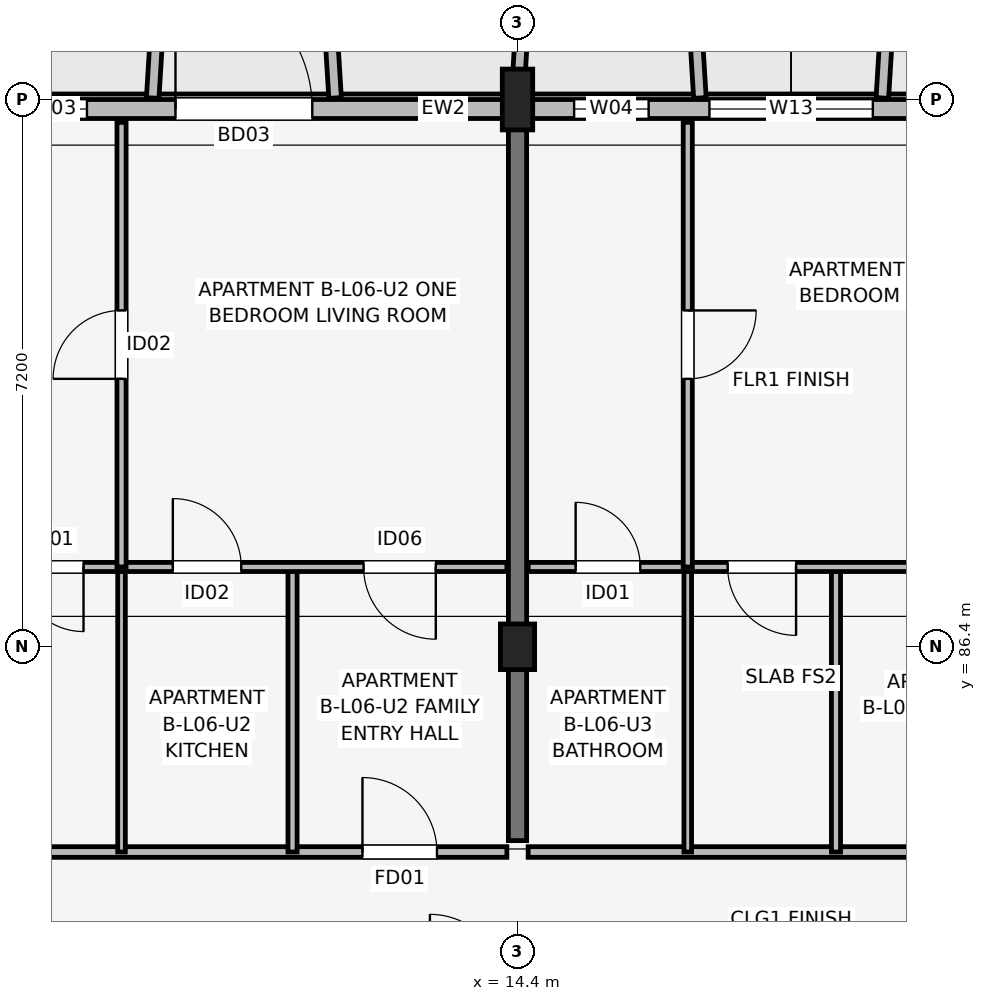
"""IFC4 building model, lengths in metres.
Left out: names, types, materials, properties, quantities, classifications, styles, units other than length and angle.
Written with IfcOpenShell. Run it as: python <this file> out.ifc"""

import sys

from ifc_helpers import new_model, si_unit, direction, frame, frame_2d, origin, origin_2d, place, context, subcontext, project, spatial, rectangle, extrude, element, fill, save


model = new_model("IFC4")
c1 = context("Model", 3, precision=1e-05, world=origin(), true_north=direction((0.0, 1.0)))
c2 = subcontext(c1, "Body", "Model", "MODEL_VIEW")
j1 = project(units=[si_unit("LENGTHUNIT", "METRE"), si_unit("PLANEANGLEUNIT", "RADIAN")], contexts=[c1])
p1 = place(None, origin())
s1 = spatial("IfcSite", under=j1, at=p1, CompositionType="ELEMENT")
p2 = place(p1, origin())
s2 = spatial("IfcBuilding", under=s1, at=p2, CompositionType="ELEMENT")
p3 = place(p2, frame((0.0, 0.0, 21.3)))
s3 = spatial("IfcBuildingStorey", under=s2, at=p3, CompositionType="ELEMENT", Elevation=21.3)
p4 = place(p3, frame((14.4, 86.4, 0.0), z_axis=(0.0, 0.0, 1.0), x_axis=(1.0, 0.0, 0.0)))
e1 = element("IfcColumn", 1, at=p4, inside=s3, PredefinedType="COLUMN", context=c2, shape_type="SweptSolid", body=[
    extrude(rectangle(XDim=0.45, YDim=0.6, at=origin_2d()), origin(), (0.0, 0.0, 1.0), 3.15),
])
p5 = place(p3, frame((14.4, 93.6, 0.0), z_axis=(0.0, 0.0, 1.0), x_axis=(1.0, 0.0, 0.0)))
e2 = element("IfcColumn", 2, at=p5, inside=s3, PredefinedType="COLUMN", context=c2, shape_type="SweptSolid", body=[
    extrude(rectangle(XDim=0.4, YDim=0.8, at=origin_2d()), origin(), (0.0, 0.0, 1.0), 3.15),
])
p6 = place(p3, frame((14.4, 83.85, 0.0), z_axis=(0.0, 0.0, 1.0), x_axis=(0.0, 1.0, 0.0)))
e3 = element("IfcWall", 3, at=p6, inside=s3, PredefinedType="SHEAR", context=c2, shape_type="SweptSolid", body=[
    extrude(rectangle(XDim=9.4, YDim=0.24, at=frame_2d((4.7, 0.0))), origin(), (0.0, 0.0, 1.0), 3.15),
])
p7 = place(p3, frame((32.8, 93.475, 0.0), z_axis=(0.0, 0.0, 1.0), x_axis=(-1.0, 0.0, 0.0)))
e4 = element("IfcWall", 4, at=p7, inside=s3, PredefinedType="SOLIDWALL", context=c2, shape_type="SweptSolid", body=[
    extrude(rectangle(XDim=29.6, YDim=0.25, at=frame_2d((14.8, 0.0))), origin(), (0.0, 0.0, 1.0), 2.43),
])
p8 = place(p7, frame((22.9, 0.0, 0.0), z_axis=(0.0, 0.0, 1.0), x_axis=(-1.0, 0.0, 0.0)))
e5 = element("IfcOpeningElement", 5, at=p8, cuts=e4, PredefinedType="OPENING", context=c2, shape_type="SweptSolid", body=[
    extrude(rectangle(XDim=1.8, YDim=2.15, at=frame_2d((0.9, 1.075))), frame((0.0, 0.135, 0.0), z_axis=(0.0, -1.0, 0.0), x_axis=(1.0, 0.0, 0.0)), (0.0, 0.0, 1.0), 0.27),
])
p9 = place(p7, frame((8.425, 0.0, 0.0), z_axis=(0.0, 0.0, 1.0), x_axis=(-1.0, 0.0, 0.0)))
e6 = element("IfcOpeningElement", 6, at=p9, cuts=e4, PredefinedType="OPENING", context=c2, shape_type="SweptSolid", body=[
    extrude(rectangle(XDim=1.65, YDim=2.15, at=frame_2d((0.825, 1.075))), frame((0.0, 0.135, 0.0), z_axis=(0.0, -1.0, 0.0), x_axis=(1.0, 0.0, 0.0)), (0.0, 0.0, 1.0), 0.27),
])
p10 = place(p7, frame((26.25, 0.0, 0.75)))
e7 = element("IfcOpeningElement", 7, at=p10, cuts=e4, PredefinedType="OPENING", context=c2, shape_type="SweptSolid", body=[
    extrude(rectangle(XDim=0.72, YDim=1.35, at=frame_2d((0.36, 0.675))), frame((0.0, 0.135, 0.0), z_axis=(0.0, -1.0, 0.0), x_axis=(1.0, 0.0, 0.0)), (0.0, 0.0, 1.0), 0.27),
])
p11 = place(p7, frame((24.065, 0.0, 0.75)))
e8 = element("IfcOpeningElement", 8, at=p11, cuts=e4, PredefinedType="OPENING", context=c2, shape_type="SweptSolid", body=[
    extrude(rectangle(XDim=0.85, YDim=1.4, at=frame_2d((0.425, 0.7))), frame((0.0, 0.135, 0.0), z_axis=(0.0, -1.0, 0.0), x_axis=(1.0, 0.0, 0.0)), (0.0, 0.0, 1.0), 0.27),
])
p12 = place(p7, frame((16.675, 0.0, 0.75)))
e9 = element("IfcOpeningElement", 9, at=p12, cuts=e4, PredefinedType="OPENING", context=c2, shape_type="SweptSolid", body=[
    extrude(rectangle(XDim=0.98, YDim=1.45, at=frame_2d((0.49, 0.725))), frame((0.0, 0.135, 0.0), z_axis=(0.0, -1.0, 0.0), x_axis=(1.0, 0.0, 0.0)), (0.0, 0.0, 1.0), 0.27),
])
p13 = place(p7, frame((13.725, 0.0, 0.67)))
e10 = element("IfcOpeningElement", 10, at=p13, cuts=e4, PredefinedType="OPENING", context=c2, shape_type="SweptSolid", body=[
    extrude(rectangle(XDim=2.15, YDim=1.65, at=frame_2d((1.075, 0.825))), frame((0.0, 0.135, 0.0), z_axis=(0.0, -1.0, 0.0), x_axis=(1.0, 0.0, 0.0)), (0.0, 0.0, 1.0), 0.27),
])
p14 = place(p7, frame((9.355, 0.0, 0.75)))
e11 = element("IfcOpeningElement", 11, at=p14, cuts=e4, PredefinedType="OPENING", context=c2, shape_type="SweptSolid", body=[
    extrude(rectangle(XDim=1.22, YDim=1.5, at=frame_2d((0.61, 0.75))), frame((0.0, 0.135, 0.0), z_axis=(0.0, -1.0, 0.0), x_axis=(1.0, 0.0, 0.0)), (0.0, 0.0, 1.0), 0.27),
])
p15 = place(p7, frame((1.89, 0.0, 0.7)))
e12 = element("IfcOpeningElement", 12, at=p15, cuts=e4, PredefinedType="OPENING", context=c2, shape_type="SweptSolid", body=[
    extrude(rectangle(XDim=1.58, YDim=1.6, at=frame_2d((0.79, 0.8))), frame((0.0, 0.135, 0.0), z_axis=(0.0, -1.0, 0.0), x_axis=(1.0, 0.0, 0.0)), (0.0, 0.0, 1.0), 0.27),
])
for number, where, z_axis, x_axis in (
    (13, (9.6, 93.62, 0.0), (0.0, 0.0, 1.0), (0.061, 0.998, 0.0)),
    (14, (12.0, 93.62, 0.0), (0.0, 0.0, 1.0), (-0.061, 0.998, 0.0)),
):
    element("IfcWall", number, at=place(p3, frame(where, z_axis=z_axis, x_axis=x_axis)), inside=s3, PredefinedType="ELEMENTEDWALL", context=c2, shape_type="SweptSolid", body=[
        extrude(rectangle(XDim=1.964, YDim=0.165, at=frame_2d((0.982, 0.0))), origin(), (0.0, 0.0, 1.0), 2.48),
    ])
for number, where, z_axis, x_axis in (
    (15, (14.4, 93.62, 0.0), (0.0, 0.0, 1.0), (0.061, 0.998, 0.0)),
    (16, (16.8, 93.62, 0.0), (0.0, 0.0, 1.0), (-0.061, 0.998, 0.0)),
    (17, (19.2, 93.62, 0.0), (0.0, 0.0, 1.0), (0.061, 0.998, 0.0)),
):
    element("IfcWall", number, at=place(p3, frame(where, z_axis=z_axis, x_axis=x_axis)), inside=s3, PredefinedType="ELEMENTEDWALL", context=c2, shape_type="SweptSolid", body=[
        extrude(rectangle(XDim=1.964, YDim=0.165, at=frame_2d((0.982, 0.0))), origin(), (0.0, 0.0, 1.0), 2.53),
    ])
p16 = place(p3, frame((7.34, 83.7, 0.0), z_axis=(0.0, 0.0, 1.0), x_axis=(1.0, 0.0, 0.0)))
e18 = element("IfcWall", 18, at=p16, inside=s3, PredefinedType="PARTITIONING", context=c2, shape_type="SweptSolid", body=[
    extrude(rectangle(XDim=6.92, YDim=0.14, at=frame_2d((3.46, 0.0))), origin(), (0.0, 0.0, 1.0), 2.38),
])
p17 = place(p16, frame((5.02, 0.0, 0.0)))
e19 = element("IfcOpeningElement", 19, at=p17, cuts=e18, PredefinedType="OPENING", context=c2, shape_type="SweptSolid", body=[
    extrude(rectangle(XDim=0.98, YDim=2.1, at=frame_2d((0.49, 1.05))), frame((0.0, 0.08, 0.0), z_axis=(0.0, -1.0, 0.0), x_axis=(1.0, 0.0, 0.0)), (0.0, 0.0, 1.0), 0.16),
])
p18 = place(p3, frame((9.19, 83.7, 0.0), z_axis=(0.0, 0.0, 1.0), x_axis=(0.0, 1.0, 0.0)))
e20 = element("IfcWall", 20, at=p18, inside=s3, PredefinedType="PARTITIONING", context=c2, shape_type="SweptSolid", body=[
    extrude(rectangle(XDim=3.75, YDim=0.1, at=frame_2d((1.875, 0.0))), origin(), (0.0, 0.0, 1.0), 2.38),
])
p19 = place(p3, frame((11.44, 83.7, 0.0), z_axis=(0.0, 0.0, 1.0), x_axis=(0.0, 1.0, 0.0)))
e21 = element("IfcWall", 21, at=p19, inside=s3, PredefinedType="PARTITIONING", context=c2, shape_type="SweptSolid", body=[
    extrude(rectangle(XDim=3.75, YDim=0.12, at=frame_2d((1.875, 0.0))), origin(), (0.0, 0.0, 1.0), 2.38),
])
p20 = place(p3, frame((7.34, 87.45, 0.0), z_axis=(0.0, 0.0, 1.0), x_axis=(1.0, 0.0, 0.0)))
e22 = element("IfcWall", 22, at=p20, inside=s3, PredefinedType="PARTITIONING", context=c2, shape_type="SweptSolid", body=[
    extrude(rectangle(XDim=6.92, YDim=0.12, at=frame_2d((3.46, 0.0))), origin(), (0.0, 0.0, 1.0), 2.38),
])
p21 = place(p20, frame((1.35, 0.0, 0.0), z_axis=(0.0, 0.0, 1.0), x_axis=(-1.0, 0.0, 0.0)))
e23 = element("IfcOpeningElement", 23, at=p21, cuts=e22, PredefinedType="OPENING", context=c2, shape_type="SweptSolid", body=[
    extrude(rectangle(XDim=0.85, YDim=2.08, at=frame_2d((0.425, 1.04))), frame((0.0, 0.07, 0.0), z_axis=(0.0, -1.0, 0.0), x_axis=(1.0, 0.0, 0.0)), (0.0, 0.0, 1.0), 0.14),
])
p22 = place(p20, frame((2.525, 0.0, 0.0)))
e24 = element("IfcOpeningElement", 24, at=p22, cuts=e22, PredefinedType="OPENING", context=c2, shape_type="SweptSolid", body=[
    extrude(rectangle(XDim=0.9, YDim=2.08, at=frame_2d((0.45, 1.04))), frame((0.0, 0.07, 0.0), z_axis=(0.0, -1.0, 0.0), x_axis=(1.0, 0.0, 0.0)), (0.0, 0.0, 1.0), 0.14),
])
p23 = place(p20, frame((5.985, 0.0, 0.0), z_axis=(0.0, 0.0, 1.0), x_axis=(-1.0, 0.0, 0.0)))
e25 = element("IfcOpeningElement", 25, at=p23, cuts=e22, PredefinedType="OPENING", context=c2, shape_type="SweptSolid", body=[
    extrude(rectangle(XDim=0.95, YDim=2.08, at=frame_2d((0.475, 1.04))), frame((0.0, 0.07, 0.0), z_axis=(0.0, -1.0, 0.0), x_axis=(1.0, 0.0, 0.0)), (0.0, 0.0, 1.0), 0.14),
])
p24 = place(p3, frame((9.19, 87.45, 0.0), z_axis=(0.0, 0.0, 1.0), x_axis=(0.0, 1.0, 0.0)))
e26 = element("IfcWall", 26, at=p24, inside=s3, PredefinedType="PARTITIONING", context=c2, shape_type="SweptSolid", body=[
    extrude(rectangle(XDim=5.85, YDim=0.12, at=frame_2d((2.925, 0.0))), origin(), (0.0, 0.0, 1.0), 2.38),
])
p25 = place(p24, frame((2.475, 0.0, 0.0)))
e27 = element("IfcOpeningElement", 27, at=p25, cuts=e26, PredefinedType="OPENING", context=c2, shape_type="SweptSolid", body=[
    extrude(rectangle(XDim=0.9, YDim=2.08, at=frame_2d((0.45, 1.04))), frame((0.0, 0.07, 0.0), z_axis=(0.0, -1.0, 0.0), x_axis=(1.0, 0.0, 0.0)), (0.0, 0.0, 1.0), 0.14),
])
p26 = place(p3, frame((14.54, 83.7, 0.0), z_axis=(0.0, 0.0, 1.0), x_axis=(1.0, 0.0, 0.0)))
e28 = element("IfcWall", 28, at=p26, inside=s3, PredefinedType="PARTITIONING", context=c2, shape_type="SweptSolid", body=[
    extrude(rectangle(XDim=6.92, YDim=0.14, at=frame_2d((3.46, 0.0))), origin(), (0.0, 0.0, 1.0), 2.38),
])
p27 = place(p26, frame((5.975, 0.0, 0.0), z_axis=(0.0, 0.0, 1.0), x_axis=(-1.0, 0.0, 0.0)))
e29 = element("IfcOpeningElement", 29, at=p27, cuts=e28, PredefinedType="OPENING", context=c2, shape_type="SweptSolid", body=[
    extrude(rectangle(XDim=0.98, YDim=2.1, at=frame_2d((0.49, 1.05))), frame((0.0, 0.08, 0.0), z_axis=(0.0, -1.0, 0.0), x_axis=(1.0, 0.0, 0.0)), (0.0, 0.0, 1.0), 0.16),
])
p28 = place(p3, frame((16.64, 83.7, 0.0), z_axis=(0.0, 0.0, 1.0), x_axis=(0.0, 1.0, 0.0)))
e30 = element("IfcWall", 30, at=p28, inside=s3, PredefinedType="PARTITIONING", context=c2, shape_type="SweptSolid", body=[
    extrude(rectangle(XDim=3.75, YDim=0.1, at=frame_2d((1.875, 0.0))), origin(), (0.0, 0.0, 1.0), 2.38),
])
p29 = place(p3, frame((18.59, 83.7, 0.0), z_axis=(0.0, 0.0, 1.0), x_axis=(0.0, 1.0, 0.0)))
e31 = element("IfcWall", 31, at=p29, inside=s3, PredefinedType="PARTITIONING", context=c2, shape_type="SweptSolid", body=[
    extrude(rectangle(XDim=3.75, YDim=0.12, at=frame_2d((1.875, 0.0))), origin(), (0.0, 0.0, 1.0), 2.38),
])
p30 = place(p3, frame((14.54, 87.45, 0.0), z_axis=(0.0, 0.0, 1.0), x_axis=(1.0, 0.0, 0.0)))
e32 = element("IfcWall", 32, at=p30, inside=s3, PredefinedType="PARTITIONING", context=c2, shape_type="SweptSolid", body=[
    extrude(rectangle(XDim=6.92, YDim=0.12, at=frame_2d((3.46, 0.0))), origin(), (0.0, 0.0, 1.0), 2.38),
])
p31 = place(p30, frame((0.625, 0.0, 0.0)))
e33 = element("IfcOpeningElement", 33, at=p31, cuts=e32, PredefinedType="OPENING", context=c2, shape_type="SweptSolid", body=[
    extrude(rectangle(XDim=0.85, YDim=2.08, at=frame_2d((0.425, 1.04))), frame((0.0, 0.07, 0.0), z_axis=(0.0, -1.0, 0.0), x_axis=(1.0, 0.0, 0.0)), (0.0, 0.0, 1.0), 0.14),
])
p32 = place(p30, frame((3.525, 0.0, 0.0), z_axis=(0.0, 0.0, 1.0), x_axis=(-1.0, 0.0, 0.0)))
e34 = element("IfcOpeningElement", 34, at=p32, cuts=e32, PredefinedType="OPENING", context=c2, shape_type="SweptSolid", body=[
    extrude(rectangle(XDim=0.9, YDim=2.08, at=frame_2d((0.45, 1.04))), frame((0.0, 0.07, 0.0), z_axis=(0.0, -1.0, 0.0), x_axis=(1.0, 0.0, 0.0)), (0.0, 0.0, 1.0), 0.14),
])
p33 = place(p30, frame((5.01, 0.0, 0.0)))
e35 = element("IfcOpeningElement", 35, at=p33, cuts=e32, PredefinedType="OPENING", context=c2, shape_type="SweptSolid", body=[
    extrude(rectangle(XDim=0.95, YDim=2.08, at=frame_2d((0.475, 1.04))), frame((0.0, 0.07, 0.0), z_axis=(0.0, -1.0, 0.0), x_axis=(1.0, 0.0, 0.0)), (0.0, 0.0, 1.0), 0.14),
])
p34 = place(p3, frame((16.64, 87.45, 0.0), z_axis=(0.0, 0.0, 1.0), x_axis=(0.0, 1.0, 0.0)))
e36 = element("IfcWall", 36, at=p34, inside=s3, PredefinedType="PARTITIONING", context=c2, shape_type="SweptSolid", body=[
    extrude(rectangle(XDim=5.85, YDim=0.12, at=frame_2d((2.925, 0.0))), origin(), (0.0, 0.0, 1.0), 2.38),
])
p35 = place(p34, frame((3.375, 0.0, 0.0), z_axis=(0.0, 0.0, 1.0), x_axis=(-1.0, 0.0, 0.0)))
e37 = element("IfcOpeningElement", 37, at=p35, cuts=e36, PredefinedType="OPENING", context=c2, shape_type="SweptSolid", body=[
    extrude(rectangle(XDim=0.9, YDim=2.08, at=frame_2d((0.45, 1.04))), frame((0.0, 0.07, 0.0), z_axis=(0.0, -1.0, 0.0), x_axis=(1.0, 0.0, 0.0)), (0.0, 0.0, 1.0), 0.14),
])
p36 = place(p8, origin())
e38 = element("IfcDoor", 38, at=p36, inside=s3, OperationType="SINGLE_SWING_RIGHT", PredefinedType="DOOR", context=c2, shape_type="SweptSolid", body=[
    extrude(rectangle(XDim=1.8, YDim=2.15, at=frame_2d((0.9, 1.075))), frame((0.0, 0.025, 0.0), z_axis=(0.0, -1.0, 0.0), x_axis=(1.0, 0.0, 0.0)), (0.0, 0.0, 1.0), 0.05),
])
fill(e5, e38)
p37 = place(p11, origin())
e39 = element("IfcWindow", 39, at=p37, inside=s3, PartitioningType="SINGLE_PANEL", PredefinedType="WINDOW", context=c2, shape_type="SweptSolid", body=[
    extrude(rectangle(XDim=0.85, YDim=1.4, at=frame_2d((0.425, 0.7))), frame((0.0, 0.03, 0.0), z_axis=(0.0, -1.0, 0.0), x_axis=(1.0, 0.0, 0.0)), (0.0, 0.0, 1.0), 0.06),
])
fill(e8, e39)
p38 = place(p12, origin())
e40 = element("IfcWindow", 40, at=p38, inside=s3, PartitioningType="SINGLE_PANEL", PredefinedType="WINDOW", context=c2, shape_type="SweptSolid", body=[
    extrude(rectangle(XDim=0.98, YDim=1.45, at=frame_2d((0.49, 0.725))), frame((0.0, 0.03, 0.0), z_axis=(0.0, -1.0, 0.0), x_axis=(1.0, 0.0, 0.0)), (0.0, 0.0, 1.0), 0.06),
])
fill(e9, e40)
p39 = place(p13, origin())
e41 = element("IfcWindow", 41, at=p39, inside=s3, PartitioningType="SINGLE_PANEL", PredefinedType="WINDOW", context=c2, shape_type="SweptSolid", body=[
    extrude(rectangle(XDim=2.15, YDim=1.65, at=frame_2d((1.075, 0.825))), frame((0.0, 0.03, 0.0), z_axis=(0.0, -1.0, 0.0), x_axis=(1.0, 0.0, 0.0)), (0.0, 0.0, 1.0), 0.06),
])
fill(e10, e41)
p40 = place(p17, origin())
e42 = element("IfcDoor", 42, at=p40, inside=s3, OperationType="SINGLE_SWING_LEFT", PredefinedType="DOOR", context=c2, shape_type="SweptSolid", body=[
    extrude(rectangle(XDim=0.98, YDim=2.1, at=frame_2d((0.49, 1.05))), frame((0.0, 0.025, 0.0), z_axis=(0.0, -1.0, 0.0), x_axis=(1.0, 0.0, 0.0)), (0.0, 0.0, 1.0), 0.05),
])
fill(e19, e42)
p41 = place(p21, origin())
e43 = element("IfcDoor", 43, at=p41, inside=s3, OperationType="SINGLE_SWING_RIGHT", PredefinedType="DOOR", context=c2, shape_type="SweptSolid", body=[
    extrude(rectangle(XDim=0.85, YDim=2.08, at=frame_2d((0.425, 1.04))), frame((0.0, 0.025, 0.0), z_axis=(0.0, -1.0, 0.0), x_axis=(1.0, 0.0, 0.0)), (0.0, 0.0, 1.0), 0.05),
])
fill(e23, e43)
p42 = place(p22, origin())
e44 = element("IfcDoor", 44, at=p42, inside=s3, OperationType="SINGLE_SWING_LEFT", PredefinedType="DOOR", context=c2, shape_type="SweptSolid", body=[
    extrude(rectangle(XDim=0.9, YDim=2.08, at=frame_2d((0.45, 1.04))), frame((0.0, 0.025, 0.0), z_axis=(0.0, -1.0, 0.0), x_axis=(1.0, 0.0, 0.0)), (0.0, 0.0, 1.0), 0.05),
])
fill(e24, e44)
p43 = place(p23, origin())
e45 = element("IfcDoor", 45, at=p43, inside=s3, OperationType="SINGLE_SWING_RIGHT", PredefinedType="DOOR", context=c2, shape_type="SweptSolid", body=[
    extrude(rectangle(XDim=0.95, YDim=2.08, at=frame_2d((0.475, 1.04))), frame((0.0, 0.025, 0.0), z_axis=(0.0, -1.0, 0.0), x_axis=(1.0, 0.0, 0.0)), (0.0, 0.0, 1.0), 0.05),
])
fill(e25, e45)
p44 = place(p25, origin())
e46 = element("IfcDoor", 46, at=p44, inside=s3, OperationType="SINGLE_SWING_LEFT", PredefinedType="DOOR", context=c2, shape_type="SweptSolid", body=[
    extrude(rectangle(XDim=0.9, YDim=2.08, at=frame_2d((0.45, 1.04))), frame((0.0, 0.025, 0.0), z_axis=(0.0, -1.0, 0.0), x_axis=(1.0, 0.0, 0.0)), (0.0, 0.0, 1.0), 0.05),
])
fill(e27, e46)
p45 = place(p31, origin())
e47 = element("IfcDoor", 47, at=p45, inside=s3, OperationType="SINGLE_SWING_LEFT", PredefinedType="DOOR", context=c2, shape_type="SweptSolid", body=[
    extrude(rectangle(XDim=0.85, YDim=2.08, at=frame_2d((0.425, 1.04))), frame((0.0, 0.025, 0.0), z_axis=(0.0, -1.0, 0.0), x_axis=(1.0, 0.0, 0.0)), (0.0, 0.0, 1.0), 0.05),
])
fill(e33, e47)
p46 = place(p32, origin())
e48 = element("IfcDoor", 48, at=p46, inside=s3, OperationType="SINGLE_SWING_RIGHT", PredefinedType="DOOR", context=c2, shape_type="SweptSolid", body=[
    extrude(rectangle(XDim=0.9, YDim=2.08, at=frame_2d((0.45, 1.04))), frame((0.0, 0.025, 0.0), z_axis=(0.0, -1.0, 0.0), x_axis=(1.0, 0.0, 0.0)), (0.0, 0.0, 1.0), 0.05),
])
fill(e34, e48)
p47 = place(p35, origin())
e49 = element("IfcDoor", 49, at=p47, inside=s3, OperationType="SINGLE_SWING_RIGHT", PredefinedType="DOOR", context=c2, shape_type="SweptSolid", body=[
    extrude(rectangle(XDim=0.9, YDim=2.08, at=frame_2d((0.45, 1.04))), frame((0.0, 0.025, 0.0), z_axis=(0.0, -1.0, 0.0), x_axis=(1.0, 0.0, 0.0)), (0.0, 0.0, 1.0), 0.05),
])
fill(e37, e49)
save(model, sys.argv[1])
